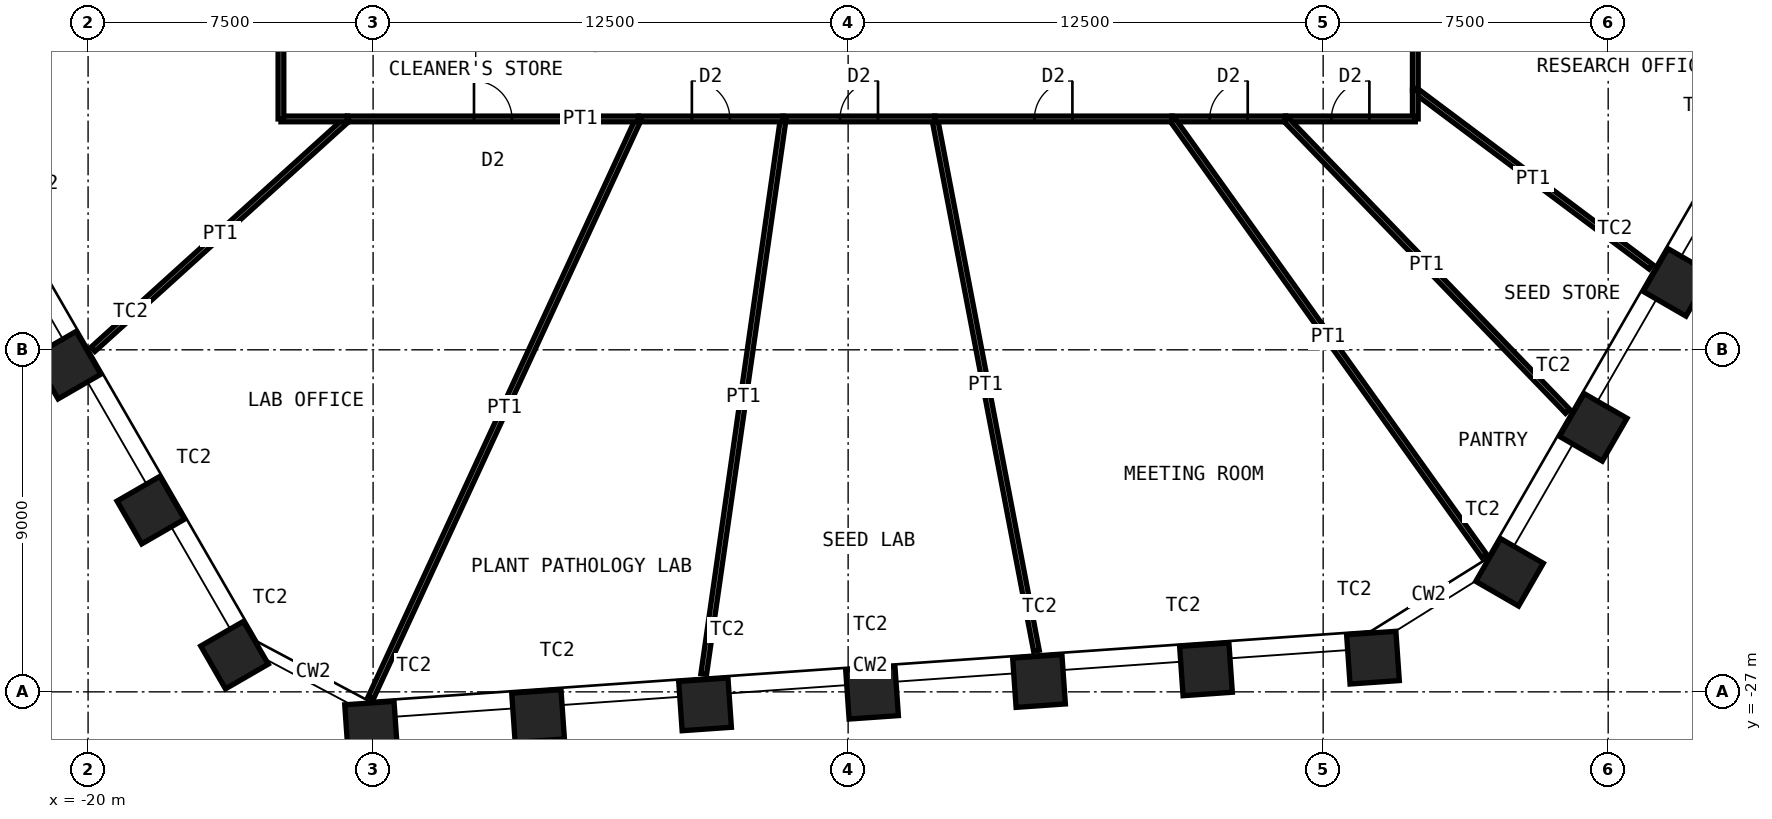
"""IFC4 building model, lengths in metres.
Left out: names, types, materials, properties, quantities, classifications, styles, units other than length and angle.
Written with IfcOpenShell. Run it as: python <this file> out.ifc"""

import sys

from ifc_helpers import new_model, si_unit, direction, frame, frame_2d, origin, origin_2d, place, context, subcontext, project, spatial, rectangle, hollow_rectangle, extrude, element, fill, save


model = new_model("IFC4")
c1 = context("Model", 3, precision=1e-05, world=origin(), true_north=direction((0.0, 1.0)))
c2 = subcontext(c1, "Body", "Model", "MODEL_VIEW")
j1 = project(units=[si_unit("LENGTHUNIT", "METRE"), si_unit("PLANEANGLEUNIT", "RADIAN")], contexts=[c1])
p1 = place(None, origin())
s1 = spatial("IfcSite", under=j1, at=p1, CompositionType="ELEMENT")
p2 = place(p1, origin())
s2 = spatial("IfcBuilding", under=s1, at=p2, CompositionType="ELEMENT")
p3 = place(p2, frame((0.0, 0.0, 82.0)))
s3 = spatial("IfcBuildingStorey", under=s2, at=p3, CompositionType="ELEMENT", Elevation=82.0)
for number, where, z_axis, x_axis in (
    (1, (21.809, -16.225, 0.0), (0.0, 0.0, 1.0), (0.5, 0.866, 0.0)),
    (2, (19.607, -20.04, 0.0), (0.0, 0.0, 1.0), (0.5, 0.866, 0.0)),
    (3, (17.405, -23.854, 0.0), (0.0, 0.0, 1.0), (0.5, 0.866, 0.0)),
    (4, (13.811, -26.1, 0.0), (0.0, 0.0, 1.0), (0.998, 0.07, 0.0)),
    (5, (9.417, -26.407, 0.0), (0.0, 0.0, 1.0), (0.998, 0.07, 0.0)),
    (6, (5.023, -26.715, 0.0), (0.0, 0.0, 1.0), (0.998, 0.07, 0.0)),
    (7, (0.629, -27.022, 0.0), (0.0, 0.0, 1.0), (0.998, 0.07, 0.0)),
    (8, (-3.765, -27.329, 0.0), (0.0, 0.0, 1.0), (0.998, 0.07, 0.0)),
    (9, (-8.159, -27.636, 0.0), (0.0, 0.0, 1.0), (0.998, 0.07, 0.0)),
    (10, (-12.553, -27.944, 0.0), (0.0, 0.0, 1.0), (0.998, 0.07, 0.0)),
    (11, (-16.147, -26.033, 0.0), (0.0, 0.0, 1.0), (0.5, -0.866, 0.0)),
    (12, (-18.349, -22.218, 0.0), (0.0, 0.0, 1.0), (0.5, -0.866, 0.0)),
    (13, (-20.552, -18.404, 0.0), (0.0, 0.0, 1.0), (0.5, -0.866, 0.0)),
):
    element("IfcColumn", number, at=place(p3, frame(where, z_axis=z_axis, x_axis=x_axis)), inside=s3, PredefinedType="COLUMN", context=c2, shape_type="SweptSolid", body=[
        extrude(hollow_rectangle(XDim=1.3, YDim=1.3, WallThickness=0.1, at=origin_2d()), origin(), (0.0, 0.0, 1.0), 5.0),
    ])
p4 = place(p3, frame((4.955, -25.918, 0.0), z_axis=(0.0, 0.0, 1.0), x_axis=(-0.187784559803, 0.982210241801, 0.0)))
e14 = element("IfcWall", 14, at=p4, inside=s3, PredefinedType="PARTITIONING", context=c2, shape_type="SweptSolid", body=[
    extrude(rectangle(XDim=14.247, YDim=0.15, at=frame_2d((7.123, 0.0))), origin(), (0.0, 0.0, 1.0), 3.7),
])
p5 = place(p3, frame((2.28, -11.925, 0.0), z_axis=(0.0, 0.0, 1.0), x_axis=(-1.0, 0.0, 0.0)))
e15 = element("IfcWall", 15, at=p5, inside=s3, PredefinedType="PARTITIONING", context=c2, shape_type="SweptSolid", body=[
    extrude(rectangle(XDim=3.988, YDim=0.15, at=frame_2d((1.994, 0.0))), origin(), (0.0, 0.0, 1.0), 4.8),
])
p6 = place(p5, frame((1.494, 0.0, 0.0)))
e16 = element("IfcOpeningElement", 16, at=p6, cuts=e15, PredefinedType="OPENING", context=c2, shape_type="SweptSolid", body=[
    extrude(rectangle(XDim=1.0, YDim=2.4, at=frame_2d((0.5, 1.2))), frame((0.0, 0.085, 0.0), z_axis=(0.0, -1.0, 0.0), x_axis=(1.0, 0.0, 0.0)), (0.0, 0.0, 1.0), 0.17),
])
p7 = place(p3, frame((-3.8, -26.532, 0.0), z_axis=(0.0, 0.0, 1.0), x_axis=(0.141775745175, 0.989898801939, 0.0)))
e17 = element("IfcWall", 17, at=p7, inside=s3, PredefinedType="PARTITIONING", context=c2, shape_type="SweptSolid", body=[
    extrude(rectangle(XDim=14.756, YDim=0.15, at=frame_2d((7.378, 0.0))), origin(), (0.0, 0.0, 1.0), 3.7),
])
p8 = place(p3, frame((-1.708, -11.925, 0.0), z_axis=(0.0, 0.0, 1.0), x_axis=(-1.0, 0.0, 0.0)))
e18 = element("IfcWall", 18, at=p8, inside=s3, PredefinedType="PARTITIONING", context=c2, shape_type="SweptSolid", body=[
    extrude(rectangle(XDim=3.808, YDim=0.15, at=frame_2d((1.904, 0.0))), origin(), (0.0, 0.0, 1.0), 4.8),
])
p9 = place(p8, frame((1.404, 0.0, 0.0)))
e19 = element("IfcOpeningElement", 19, at=p9, cuts=e18, PredefinedType="OPENING", context=c2, shape_type="SweptSolid", body=[
    extrude(rectangle(XDim=1.0, YDim=2.4, at=frame_2d((0.5, 1.2))), frame((0.0, 0.085, 0.0), z_axis=(0.0, -1.0, 0.0), x_axis=(1.0, 0.0, 0.0)), (0.0, 0.0, 1.0), 0.17),
])
p10 = place(p3, frame((-12.56, -27.155, 0.0), z_axis=(0.0, 0.0, 1.0), x_axis=(0.41979248878, 0.90762011126, 0.0)))
e20 = element("IfcWall", 20, at=p10, inside=s3, PredefinedType="PARTITIONING", context=c2, shape_type="SweptSolid", body=[
    extrude(rectangle(XDim=16.78, YDim=0.15, at=frame_2d((8.39, 0.0))), origin(), (0.0, 0.0, 1.0), 3.7),
])
p11 = place(p3, frame((-5.516, -11.925, 0.0), z_axis=(0.0, 0.0, 1.0), x_axis=(-1.0, 0.0, 0.0)))
e21 = element("IfcWall", 21, at=p11, inside=s3, PredefinedType="PARTITIONING", context=c2, shape_type="SweptSolid", body=[
    extrude(rectangle(XDim=7.659, YDim=0.15, at=frame_2d((3.83, 0.0))), origin(), (0.0, 0.0, 1.0), 4.8),
])
p12 = place(p11, frame((3.329, 0.0, 0.0)))
e22 = element("IfcOpeningElement", 22, at=p12, cuts=e21, PredefinedType="OPENING", context=c2, shape_type="SweptSolid", body=[
    extrude(rectangle(XDim=1.0, YDim=2.4, at=frame_2d((0.5, 1.2))), frame((0.0, 0.085, 0.0), z_axis=(0.0, -1.0, 0.0), x_axis=(1.0, 0.0, 0.0)), (0.0, 0.0, 1.0), 0.17),
])
p13 = place(p3, frame((-19.871, -17.987, 0.0), z_axis=(0.0, 0.0, 1.0), x_axis=(0.741383998931, 0.671081042892, 0.0)))
e23 = element("IfcWall", 23, at=p13, inside=s3, PredefinedType="PARTITIONING", context=c2, shape_type="SweptSolid", body=[
    extrude(rectangle(XDim=9.032, YDim=0.15, at=frame_2d((4.516, 0.0))), origin(), (0.0, 0.0, 1.0), 3.7),
])
p14 = place(p3, frame((-13.175, -11.925, 0.0), z_axis=(0.0, 0.0, 1.0), x_axis=(-1.0, 0.0, 0.0)))
e24 = element("IfcWall", 24, at=p14, inside=s3, PredefinedType="PARTITIONING", context=c2, shape_type="SweptSolid", body=[
    extrude(rectangle(XDim=1.75, YDim=0.15, at=frame_2d((0.875, 0.0))), origin(), (0.0, 0.0, 1.0), 4.8),
])
p15 = place(p3, frame((-14.925, -11.925, 0.0), z_axis=(0.0, 0.0, 1.0), x_axis=(0.0, 1.0, 0.0)))
e25 = element("IfcWall", 25, at=p15, inside=s3, PredefinedType="PARTITIONING", context=c2, shape_type="SweptSolid", body=[
    extrude(rectangle(XDim=8.209, YDim=0.15, at=frame_2d((4.105, 0.0))), origin(), (0.0, 0.0, 1.0), 4.8),
])
p16 = place(p15, frame((3.205, 0.0, 0.0)))
e26 = element("IfcOpeningElement", 26, at=p16, cuts=e25, PredefinedType="OPENING", context=c2, shape_type="SweptSolid", body=[
    extrude(rectangle(XDim=1.8, YDim=2.4, at=frame_2d((0.9, 1.2))), frame((0.0, 0.085, 0.0), z_axis=(0.0, -1.0, 0.0), x_axis=(1.0, 0.0, 0.0)), (0.0, 0.0, 1.0), 0.17),
])
p17 = place(p3, frame((14.925, -4.806, 0.0), z_axis=(0.0, 0.0, 1.0), x_axis=(0.0, -1.0, 0.0)))
e27 = element("IfcWall", 27, at=p17, inside=s3, PredefinedType="PARTITIONING", context=c2, shape_type="SweptSolid", body=[
    extrude(rectangle(XDim=6.369, YDim=0.15, at=frame_2d((3.184, 0.0))), origin(), (0.0, 0.0, 1.0), 4.8),
])
p18 = place(p17, frame((2.684, 0.0, 0.0)))
e28 = element("IfcOpeningElement", 28, at=p18, cuts=e27, PredefinedType="OPENING", context=c2, shape_type="SweptSolid", body=[
    extrude(rectangle(XDim=1.0, YDim=2.4, at=frame_2d((0.5, 1.2))), frame((0.0, 0.085, 0.0), z_axis=(0.0, -1.0, 0.0), x_axis=(1.0, 0.0, 0.0)), (0.0, 0.0, 1.0), 0.17),
])
p19 = place(p3, frame((21.123, -15.815, 0.0), z_axis=(0.0, 0.0, 1.0), x_axis=(-0.800487841468, 0.59934899321, 0.0)))
e29 = element("IfcWall", 29, at=p19, inside=s3, PredefinedType="PARTITIONING", context=c2, shape_type="SweptSolid", body=[
    extrude(rectangle(XDim=7.743, YDim=0.15, at=frame_2d((3.871, 0.0))), origin(), (0.0, 0.0, 1.0), 3.7),
])
p20 = place(p3, frame((14.925, -11.175, 0.0), z_axis=(0.0, 0.0, 1.0), x_axis=(0.0, -1.0, 0.0)))
e30 = element("IfcWall", 30, at=p20, inside=s3, PredefinedType="PARTITIONING", context=c2, shape_type="SweptSolid", body=[
    extrude(rectangle(XDim=0.75, YDim=0.15, at=frame_2d((0.375, 0.0))), origin(), (0.0, 0.0, 1.0), 4.8),
])
p21 = place(p3, frame((14.925, -11.925, 0.0), z_axis=(0.0, 0.0, 1.0), x_axis=(-1.0, 0.0, 0.0)))
e31 = element("IfcWall", 31, at=p21, inside=s3, PredefinedType="PARTITIONING", context=c2, shape_type="SweptSolid", body=[
    extrude(rectangle(XDim=3.417, YDim=0.15, at=frame_2d((1.709, 0.0))), origin(), (0.0, 0.0, 1.0), 4.8),
])
p22 = place(p21, frame((1.209, 0.0, 0.0)))
e32 = element("IfcOpeningElement", 32, at=p22, cuts=e31, PredefinedType="OPENING", context=c2, shape_type="SweptSolid", body=[
    extrude(rectangle(XDim=1.0, YDim=2.4, at=frame_2d((0.5, 1.2))), frame((0.0, 0.085, 0.0), z_axis=(0.0, -1.0, 0.0), x_axis=(1.0, 0.0, 0.0)), (0.0, 0.0, 1.0), 0.17),
])
p23 = place(p3, frame((18.931, -19.618, 0.0), z_axis=(0.0, 0.0, 1.0), x_axis=(-0.694400087022, 0.719589132175, 0.0)))
e33 = element("IfcWall", 33, at=p23, inside=s3, PredefinedType="PARTITIONING", context=c2, shape_type="SweptSolid", body=[
    extrude(rectangle(XDim=10.691, YDim=0.15, at=frame_2d((5.345, 0.0))), origin(), (0.0, 0.0, 1.0), 3.7),
])
p24 = place(p3, frame((11.508, -11.925, 0.0), z_axis=(0.0, 0.0, 1.0), x_axis=(-1.0, 0.0, 0.0)))
e34 = element("IfcWall", 34, at=p24, inside=s3, PredefinedType="PARTITIONING", context=c2, shape_type="SweptSolid", body=[
    extrude(rectangle(XDim=2.985, YDim=0.15, at=frame_2d((1.492, 0.0))), origin(), (0.0, 0.0, 1.0), 4.8),
])
p25 = place(p24, frame((0.992, 0.0, 0.0)))
e35 = element("IfcOpeningElement", 35, at=p25, cuts=e34, PredefinedType="OPENING", context=c2, shape_type="SweptSolid", body=[
    extrude(rectangle(XDim=1.0, YDim=2.4, at=frame_2d((0.5, 1.2))), frame((0.0, 0.085, 0.0), z_axis=(0.0, -1.0, 0.0), x_axis=(1.0, 0.0, 0.0)), (0.0, 0.0, 1.0), 0.17),
])
p26 = place(p3, frame((16.74, -23.423, 0.0), z_axis=(0.0, 0.0, 1.0), x_axis=(-0.581455509775, 0.813578201621, 0.0)))
e36 = element("IfcWall", 36, at=p26, inside=s3, PredefinedType="PARTITIONING", context=c2, shape_type="SweptSolid", body=[
    extrude(rectangle(XDim=14.133, YDim=0.15, at=frame_2d((7.066, 0.0))), origin(), (0.0, 0.0, 1.0), 3.7),
])
p27 = place(p3, frame((8.523, -11.925, 0.0), z_axis=(0.0, 0.0, 1.0), x_axis=(-1.0, 0.0, 0.0)))
e37 = element("IfcWall", 37, at=p27, inside=s3, PredefinedType="PARTITIONING", context=c2, shape_type="SweptSolid", body=[
    extrude(rectangle(XDim=6.243, YDim=0.15, at=frame_2d((3.122, 0.0))), origin(), (0.0, 0.0, 1.0), 4.8),
])
p28 = place(p27, frame((2.621, 0.0, 0.0)))
e38 = element("IfcOpeningElement", 38, at=p28, cuts=e37, PredefinedType="OPENING", context=c2, shape_type="SweptSolid", body=[
    extrude(rectangle(XDim=1.0, YDim=2.4, at=frame_2d((0.5, 1.2))), frame((0.0, 0.085, 0.0), z_axis=(0.0, -1.0, 0.0), x_axis=(1.0, 0.0, 0.0)), (0.0, 0.0, 1.0), 0.17),
])
p29 = place(p6, origin())
e39 = element("IfcDoor", 39, at=p29, inside=s3, OperationType="SINGLE_SWING_LEFT", PredefinedType="DOOR", context=c2, shape_type="SweptSolid", body=[
    extrude(rectangle(XDim=1.0, YDim=2.4, at=frame_2d((0.5, 1.2))), frame((0.0, 0.025, 0.0), z_axis=(0.0, -1.0, 0.0), x_axis=(1.0, 0.0, 0.0)), (0.0, 0.0, 1.0), 0.05),
])
fill(e16, e39)
p30 = place(p9, origin())
e40 = element("IfcDoor", 40, at=p30, inside=s3, OperationType="SINGLE_SWING_RIGHT", PredefinedType="DOOR", context=c2, shape_type="SweptSolid", body=[
    extrude(rectangle(XDim=1.0, YDim=2.4, at=frame_2d((0.5, 1.2))), frame((0.0, 0.025, 0.0), z_axis=(0.0, -1.0, 0.0), x_axis=(1.0, 0.0, 0.0)), (0.0, 0.0, 1.0), 0.05),
])
fill(e19, e40)
p31 = place(p12, origin())
e41 = element("IfcDoor", 41, at=p31, inside=s3, OperationType="SINGLE_SWING_RIGHT", PredefinedType="DOOR", context=c2, shape_type="SweptSolid", body=[
    extrude(rectangle(XDim=1.0, YDim=2.4, at=frame_2d((0.5, 1.2))), frame((0.0, 0.025, 0.0), z_axis=(0.0, -1.0, 0.0), x_axis=(1.0, 0.0, 0.0)), (0.0, 0.0, 1.0), 0.05),
])
fill(e22, e41)
p32 = place(p22, origin())
e42 = element("IfcDoor", 42, at=p32, inside=s3, OperationType="SINGLE_SWING_LEFT", PredefinedType="DOOR", context=c2, shape_type="SweptSolid", body=[
    extrude(rectangle(XDim=1.0, YDim=2.4, at=frame_2d((0.5, 1.2))), frame((0.0, 0.025, 0.0), z_axis=(0.0, -1.0, 0.0), x_axis=(1.0, 0.0, 0.0)), (0.0, 0.0, 1.0), 0.05),
])
fill(e32, e42)
p33 = place(p25, origin())
e43 = element("IfcDoor", 43, at=p33, inside=s3, OperationType="SINGLE_SWING_LEFT", PredefinedType="DOOR", context=c2, shape_type="SweptSolid", body=[
    extrude(rectangle(XDim=1.0, YDim=2.4, at=frame_2d((0.5, 1.2))), frame((0.0, 0.025, 0.0), z_axis=(0.0, -1.0, 0.0), x_axis=(1.0, 0.0, 0.0)), (0.0, 0.0, 1.0), 0.05),
])
fill(e35, e43)
p34 = place(p28, origin())
e44 = element("IfcDoor", 44, at=p34, inside=s3, OperationType="SINGLE_SWING_LEFT", PredefinedType="DOOR", context=c2, shape_type="SweptSolid", body=[
    extrude(rectangle(XDim=1.0, YDim=2.4, at=frame_2d((0.5, 1.2))), frame((0.0, 0.025, 0.0), z_axis=(0.0, -1.0, 0.0), x_axis=(1.0, 0.0, 0.0)), (0.0, 0.0, 1.0), 0.05),
])
fill(e38, e44)
save(model, sys.argv[1])
